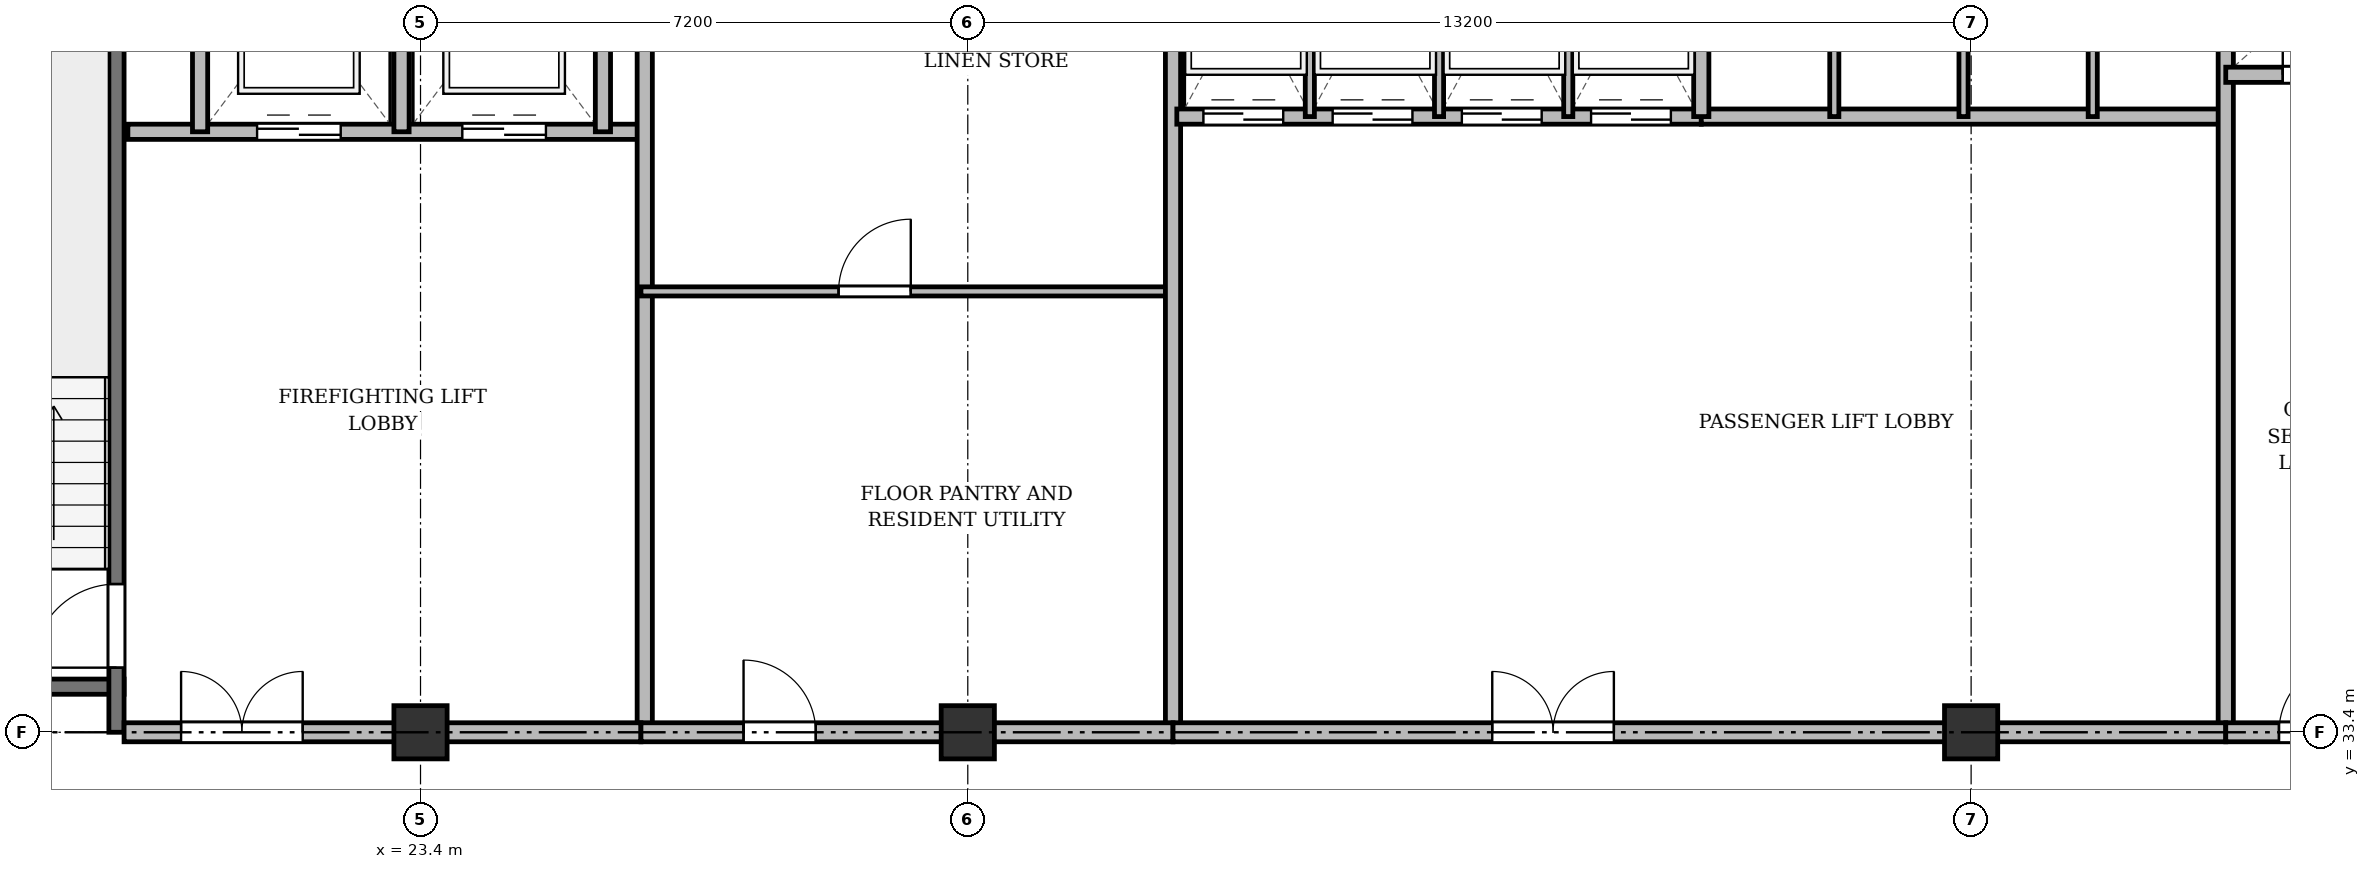
"""IFC4 building model, lengths in metres.
Left out: names, types, materials, properties, quantities, classifications, styles, units other than length and angle.
Written with IfcOpenShell. Run it as: python <this file> out.ifc"""

import sys

from ifc_helpers import new_model, si_unit, direction, frame, frame_2d, origin, origin_2d, place, context, subcontext, project, spatial, rectangle, extrude, source, transform, mapped, element, fill, save


model = new_model("IFC4")
c1 = context("Model", 3, precision=1e-05, world=origin(), true_north=direction((0.0, 1.0)))
c2 = subcontext(c1, "Body", "Model", "MODEL_VIEW")
j1 = project(units=[si_unit("LENGTHUNIT", "METRE"), si_unit("PLANEANGLEUNIT", "RADIAN")], contexts=[c1])
p1 = place(None, origin())
s1 = spatial("IfcSite", under=j1, at=p1, CompositionType="ELEMENT")
p2 = place(p1, origin())
s2 = spatial("IfcBuilding", under=s1, at=p2, CompositionType="ELEMENT")
p3 = place(p2, frame((0.0, 0.0, 164.5)))
s3 = spatial("IfcBuildingStorey", under=s2, at=p3, CompositionType="ELEMENT", Elevation=164.5)
m1 = source(origin(), c2, "Body", "SweptSolid", [
    extrude(rectangle(XDim=0.7, YDim=0.7, at=origin_2d()), origin(), (0.0, 0.0, 1.0), 3.6),
])
for number, where, z_axis, x_axis in (
    (1, (23.4, 33.4, 0.0), (0.0, 0.0, 1.0), (1.0, 0.0, 0.0)),
    (2, (30.6, 33.4, 0.0), (0.0, 0.0, 1.0), (1.0, 0.0, 0.0)),
    (3, (43.8, 33.4, 0.0), (0.0, 0.0, 1.0), (1.0, 0.0, 0.0)),
):
    element("IfcColumn", number, at=place(p3, frame(where, z_axis=z_axis, x_axis=x_axis)), inside=s3, PredefinedType="COLUMN", context=c2, shape_type="MappedRepresentation", body=[
        mapped(m1, transform((0.0, 0.0, 0.0), x_axis=(1.0, 0.0, 0.0), y_axis=(0.0, 1.0, 0.0), z_axis=(0.0, 0.0, 1.0), scale=1.0)),
    ])
p4 = place(p3, frame((16.1, 34.0, 0.0), z_axis=(0.0, 0.0, 1.0), x_axis=(1.0, 0.0, 0.0)))
e4 = element("IfcWall", 4, at=p4, inside=s3, PredefinedType="SHEAR", context=c2, shape_type="SweptSolid", body=[
    extrude(rectangle(XDim=3.4, YDim=0.2, at=frame_2d((1.7, 0.0))), origin(), (0.0, 0.0, 1.0), 3.35),
])
p5 = place(p3, frame((19.4, 33.4, 0.0), z_axis=(0.0, 0.0, 1.0), x_axis=(0.0, 1.0, 0.0)))
e5 = element("IfcWall", 5, at=p5, inside=s3, PredefinedType="SHEAR", context=c2, shape_type="SweptSolid", body=[
    extrude(rectangle(XDim=11.1, YDim=0.2, at=frame_2d((5.55, 0.0))), origin(), (0.0, 0.0, 1.0), 3.35),
])
p6 = place(p5, frame((0.85, 0.0, 0.0)))
e6 = element("IfcOpeningElement", 6, at=p6, cuts=e5, PredefinedType="OPENING", context=c2, shape_type="SweptSolid", body=[
    extrude(rectangle(XDim=1.1, YDim=2.15, at=frame_2d((0.55, 1.075))), frame((0.0, 0.11, 0.0), z_axis=(0.0, -1.0, 0.0), x_axis=(1.0, 0.0, 0.0)), (0.0, 0.0, 1.0), 0.22),
])
p7 = place(p3, frame((19.55, 41.3, 0.0), z_axis=(0.0, 0.0, 1.0), x_axis=(1.0, 0.0, 0.0)))
e7 = element("IfcWall", 7, at=p7, inside=s3, PredefinedType="SOLIDWALL", context=c2, shape_type="SweptSolid", body=[
    extrude(rectangle(XDim=6.75, YDim=0.2, at=frame_2d((3.375, 0.0))), origin(), (0.0, 0.0, 1.0), 3.35),
])
p8 = place(p7, frame((1.7, 0.0, 0.0)))
e8 = element("IfcOpeningElement", 8, at=p8, cuts=e7, PredefinedType="OPENING", context=c2, shape_type="SweptSolid", body=[
    extrude(rectangle(XDim=1.1, YDim=2.15, at=frame_2d((0.55, 1.075))), frame((0.0, 0.11, 0.0), z_axis=(0.0, -1.0, 0.0), x_axis=(1.0, 0.0, 0.0)), (0.0, 0.0, 1.0), 0.22),
])
p9 = place(p7, frame((4.4, 0.0, 0.0)))
e9 = element("IfcOpeningElement", 9, at=p9, cuts=e7, PredefinedType="OPENING", context=c2, shape_type="SweptSolid", body=[
    extrude(rectangle(XDim=1.1, YDim=2.15, at=frame_2d((0.55, 1.075))), frame((0.0, 0.11, 0.0), z_axis=(0.0, -1.0, 0.0), x_axis=(1.0, 0.0, 0.0)), (0.0, 0.0, 1.0), 0.22),
])
for number, where, z_axis, x_axis in (
    (10, (20.5, 41.3, 0.0), (0.0, 0.0, 1.0), (0.0, 1.0, 0.0)),
    (11, (23.15, 41.3, 0.0), (0.0, 0.0, 1.0), (0.0, 1.0, 0.0)),
    (12, (25.8, 41.3, 0.0), (0.0, 0.0, 1.0), (0.0, 1.0, 0.0)),
):
    element("IfcWall", number, at=place(p3, frame(where, z_axis=z_axis, x_axis=x_axis)), inside=s3, PredefinedType="SOLIDWALL", context=c2, shape_type="SweptSolid", body=[
        extrude(rectangle(XDim=3.4, YDim=0.2, at=frame_2d((1.7, 0.0))), origin(), (0.0, 0.0, 1.0), 3.35),
    ])
p10 = place(p3, frame((26.35, 33.4, 0.0), z_axis=(0.0, 0.0, 1.0), x_axis=(0.0, 1.0, 0.0)))
e13 = element("IfcWall", 13, at=p10, inside=s3, PredefinedType="SOLIDWALL", context=c2, shape_type="SweptSolid", body=[
    extrude(rectangle(XDim=11.3, YDim=0.2, at=frame_2d((5.65, 0.0))), origin(), (0.0, 0.0, 1.0), 2.75),
])
p11 = place(p3, frame((19.5, 33.4, 0.0), z_axis=(0.0, 0.0, 1.0), x_axis=(1.0, 0.0, 0.0)))
e14 = element("IfcWall", 14, at=p11, inside=s3, PredefinedType="PARTITIONING", context=c2, shape_type="SweptSolid", body=[
    extrude(rectangle(XDim=6.8, YDim=0.25, at=frame_2d((3.4, 0.0))), origin(), (0.0, 0.0, 1.0), 2.75),
])
p12 = place(p11, frame((0.75, 0.0, 0.0)))
e15 = element("IfcOpeningElement", 15, at=p12, cuts=e14, PredefinedType="OPENING", context=c2, shape_type="SweptSolid", body=[
    extrude(rectangle(XDim=1.6, YDim=2.2, at=frame_2d((0.8, 1.1))), frame((0.0, 0.135, 0.0), z_axis=(0.0, -1.0, 0.0), x_axis=(1.0, 0.0, 0.0)), (0.0, 0.0, 1.0), 0.27),
])
p13 = place(p3, frame((26.3, 39.2, 0.0), z_axis=(0.0, 0.0, 1.0), x_axis=(1.0, 0.0, 0.0)))
e16 = element("IfcWall", 16, at=p13, inside=s3, PredefinedType="PARTITIONING", context=c2, shape_type="SweptSolid", body=[
    extrude(rectangle(XDim=7.0, YDim=0.12, at=frame_2d((3.5, 0.0))), origin(), (0.0, 0.0, 1.0), 2.85),
])
p14 = place(p13, frame((2.6, 0.0, 0.0)))
e17 = element("IfcOpeningElement", 17, at=p14, cuts=e16, PredefinedType="OPENING", context=c2, shape_type="SweptSolid", body=[
    extrude(rectangle(XDim=0.95, YDim=2.15, at=frame_2d((0.475, 1.075))), frame((0.0, 0.07, 0.0), z_axis=(0.0, -1.0, 0.0), x_axis=(1.0, 0.0, 0.0)), (0.0, 0.0, 1.0), 0.14),
])
p15 = place(p3, frame((33.3, 33.4, 0.0), z_axis=(0.0, 0.0, 1.0), x_axis=(0.0, 1.0, 0.0)))
e18 = element("IfcWall", 18, at=p15, inside=s3, PredefinedType="SOLIDWALL", context=c2, shape_type="SweptSolid", body=[
    extrude(rectangle(XDim=11.3, YDim=0.2, at=frame_2d((5.65, 0.0))), origin(), (0.0, 0.0, 1.0), 2.75),
])
p16 = place(p3, frame((33.35, 41.5, 0.0), z_axis=(0.0, 0.0, 1.0), x_axis=(1.0, 0.0, 0.0)))
e19 = element("IfcWall", 19, at=p16, inside=s3, PredefinedType="SOLIDWALL", context=c2, shape_type="SweptSolid", body=[
    extrude(rectangle(XDim=6.9, YDim=0.2, at=frame_2d((3.45, 0.0))), origin(), (0.0, 0.0, 1.0), 3.35),
])
p17 = place(p16, frame((0.35, 0.0, 0.0)))
e20 = element("IfcOpeningElement", 20, at=p17, cuts=e19, PredefinedType="OPENING", context=c2, shape_type="SweptSolid", body=[
    extrude(rectangle(XDim=1.05, YDim=2.15, at=frame_2d((0.525, 1.075))), frame((0.0, 0.11, 0.0), z_axis=(0.0, -1.0, 0.0), x_axis=(1.0, 0.0, 0.0)), (0.0, 0.0, 1.0), 0.22),
])
p18 = place(p16, frame((2.05, 0.0, 0.0)))
e21 = element("IfcOpeningElement", 21, at=p18, cuts=e19, PredefinedType="OPENING", context=c2, shape_type="SweptSolid", body=[
    extrude(rectangle(XDim=1.05, YDim=2.15, at=frame_2d((0.525, 1.075))), frame((0.0, 0.11, 0.0), z_axis=(0.0, -1.0, 0.0), x_axis=(1.0, 0.0, 0.0)), (0.0, 0.0, 1.0), 0.22),
])
p19 = place(p16, frame((3.75, 0.0, 0.0)))
e22 = element("IfcOpeningElement", 22, at=p19, cuts=e19, PredefinedType="OPENING", context=c2, shape_type="SweptSolid", body=[
    extrude(rectangle(XDim=1.05, YDim=2.15, at=frame_2d((0.525, 1.075))), frame((0.0, 0.11, 0.0), z_axis=(0.0, -1.0, 0.0), x_axis=(1.0, 0.0, 0.0)), (0.0, 0.0, 1.0), 0.22),
])
p20 = place(p16, frame((5.45, 0.0, 0.0)))
e23 = element("IfcOpeningElement", 23, at=p20, cuts=e19, PredefinedType="OPENING", context=c2, shape_type="SweptSolid", body=[
    extrude(rectangle(XDim=1.05, YDim=2.15, at=frame_2d((0.525, 1.075))), frame((0.0, 0.11, 0.0), z_axis=(0.0, -1.0, 0.0), x_axis=(1.0, 0.0, 0.0)), (0.0, 0.0, 1.0), 0.22),
])
for number, where, z_axis, x_axis in (
    (24, (35.1, 41.5, 0.0), (0.0, 0.0, 1.0), (0.0, 1.0, 0.0)),
    (25, (36.8, 41.5, 0.0), (0.0, 0.0, 1.0), (0.0, 1.0, 0.0)),
    (26, (38.5, 41.5, 0.0), (0.0, 0.0, 1.0), (0.0, 1.0, 0.0)),
):
    element("IfcWall", number, at=place(p3, frame(where, z_axis=z_axis, x_axis=x_axis)), inside=s3, PredefinedType="PARTITIONING", context=c2, shape_type="SweptSolid", body=[
        extrude(rectangle(XDim=3.2, YDim=0.12, at=frame_2d((1.6, 0.0))), origin(), (0.0, 0.0, 1.0), 3.35),
    ])
p21 = place(p3, frame((40.25, 41.5, 0.0), z_axis=(0.0, 0.0, 1.0), x_axis=(1.0, 0.0, 0.0)))
e27 = element("IfcWall", 27, at=p21, inside=s3, PredefinedType="SOLIDWALL", context=c2, shape_type="SweptSolid", body=[
    extrude(rectangle(XDim=6.9, YDim=0.2, at=frame_2d((3.45, 0.0))), origin(), (0.0, 0.0, 1.0), 2.85),
])
p22 = place(p3, frame((40.25, 41.5, 0.0), z_axis=(0.0, 0.0, 1.0), x_axis=(0.0, 1.0, 0.0)))
e28 = element("IfcWall", 28, at=p22, inside=s3, PredefinedType="SOLIDWALL", context=c2, shape_type="SweptSolid", body=[
    extrude(rectangle(XDim=3.2, YDim=0.2, at=frame_2d((1.6, 0.0))), origin(), (0.0, 0.0, 1.0), 3.35),
])
p23 = place(p3, frame((42.0, 41.5, 0.0), z_axis=(0.0, 0.0, 1.0), x_axis=(0.0, 1.0, 0.0)))
e29 = element("IfcWall", 29, at=p23, inside=s3, PredefinedType="PARTITIONING", context=c2, shape_type="SweptSolid", body=[
    extrude(rectangle(XDim=3.2, YDim=0.12, at=frame_2d((1.6, 0.0))), origin(), (0.0, 0.0, 1.0), 3.35),
])
p24 = place(p3, frame((43.7, 41.5, 0.0), z_axis=(0.0, 0.0, 1.0), x_axis=(0.0, 1.0, 0.0)))
e30 = element("IfcWall", 30, at=p24, inside=s3, PredefinedType="PARTITIONING", context=c2, shape_type="SweptSolid", body=[
    extrude(rectangle(XDim=3.2, YDim=0.12, at=frame_2d((1.6, 0.0))), origin(), (0.0, 0.0, 1.0), 2.85),
])
p25 = place(p3, frame((45.4, 41.5, 0.0), z_axis=(0.0, 0.0, 1.0), x_axis=(0.0, 1.0, 0.0)))
e31 = element("IfcWall", 31, at=p25, inside=s3, PredefinedType="PARTITIONING", context=c2, shape_type="SweptSolid", body=[
    extrude(rectangle(XDim=3.2, YDim=0.12, at=frame_2d((1.6, 0.0))), origin(), (0.0, 0.0, 1.0), 3.35),
])
p26 = place(p3, frame((47.15, 33.4, 0.0), z_axis=(0.0, 0.0, 1.0), x_axis=(0.0, 1.0, 0.0)))
e32 = element("IfcWall", 32, at=p26, inside=s3, PredefinedType="SOLIDWALL", context=c2, shape_type="SweptSolid", body=[
    extrude(rectangle(XDim=11.3, YDim=0.2, at=frame_2d((5.65, 0.0))), origin(), (0.0, 0.0, 1.0), 2.75),
])
p27 = place(p3, frame((26.3, 33.4, 0.0), z_axis=(0.0, 0.0, 1.0), x_axis=(1.0, 0.0, 0.0)))
e33 = element("IfcWall", 33, at=p27, inside=s3, PredefinedType="PARTITIONING", context=c2, shape_type="SweptSolid", body=[
    extrude(rectangle(XDim=7.0, YDim=0.25, at=frame_2d((3.5, 0.0))), origin(), (0.0, 0.0, 1.0), 2.75),
])
p28 = place(p27, frame((1.35, 0.0, 0.0)))
e34 = element("IfcOpeningElement", 34, at=p28, cuts=e33, PredefinedType="OPENING", context=c2, shape_type="SweptSolid", body=[
    extrude(rectangle(XDim=0.95, YDim=2.15, at=frame_2d((0.475, 1.075))), frame((0.0, 0.135, 0.0), z_axis=(0.0, -1.0, 0.0), x_axis=(1.0, 0.0, 0.0)), (0.0, 0.0, 1.0), 0.27),
])
p29 = place(p3, frame((33.3, 33.4, 0.0), z_axis=(0.0, 0.0, 1.0), x_axis=(1.0, 0.0, 0.0)))
e35 = element("IfcWall", 35, at=p29, inside=s3, PredefinedType="PARTITIONING", context=c2, shape_type="SweptSolid", body=[
    extrude(rectangle(XDim=13.85, YDim=0.25, at=frame_2d((6.925, 0.0))), origin(), (0.0, 0.0, 1.0), 2.75),
])
p30 = place(p29, frame((4.2, 0.0, 0.0)))
e36 = element("IfcOpeningElement", 36, at=p30, cuts=e35, PredefinedType="OPENING", context=c2, shape_type="SweptSolid", body=[
    extrude(rectangle(XDim=1.6, YDim=2.2, at=frame_2d((0.8, 1.1))), frame((0.0, 0.135, 0.0), z_axis=(0.0, -1.0, 0.0), x_axis=(1.0, 0.0, 0.0)), (0.0, 0.0, 1.0), 0.27),
])
p31 = place(p3, frame((47.15, 42.05, 0.0), z_axis=(0.0, 0.0, 1.0), x_axis=(1.0, 0.0, 0.0)))
e37 = element("IfcWall", 37, at=p31, inside=s3, PredefinedType="SOLIDWALL", context=c2, shape_type="SweptSolid", body=[
    extrude(rectangle(XDim=7.85, YDim=0.2, at=frame_2d((3.925, 0.0))), origin(), (0.0, 0.0, 1.0), 2.85),
])
p32 = place(p31, frame((0.75, 0.0, 0.0)))
e38 = element("IfcOpeningElement", 38, at=p32, cuts=e37, PredefinedType="OPENING", context=c2, shape_type="SweptSolid", body=[
    extrude(rectangle(XDim=0.9, YDim=2.1, at=frame_2d((0.45, 1.05))), frame((0.0, 0.11, 0.0), z_axis=(0.0, -1.0, 0.0), x_axis=(1.0, 0.0, 0.0)), (0.0, 0.0, 1.0), 0.22),
])
p33 = place(p31, frame((3.85, 0.0, 0.0)))
e39 = element("IfcOpeningElement", 39, at=p33, cuts=e37, PredefinedType="OPENING", context=c2, shape_type="SweptSolid", body=[
    extrude(rectangle(XDim=0.9, YDim=2.1, at=frame_2d((0.45, 1.05))), frame((0.0, 0.11, 0.0), z_axis=(0.0, -1.0, 0.0), x_axis=(1.0, 0.0, 0.0)), (0.0, 0.0, 1.0), 0.22),
])
p34 = place(p3, frame((47.15, 33.4, 0.0), z_axis=(0.0, 0.0, 1.0), x_axis=(1.0, 0.0, 0.0)))
e40 = element("IfcWall", 40, at=p34, inside=s3, PredefinedType="PARTITIONING", context=c2, shape_type="SweptSolid", body=[
    extrude(rectangle(XDim=11.15, YDim=0.25, at=frame_2d((5.575, 0.0))), origin(), (0.0, 0.0, 1.0), 2.75),
])
p35 = place(p34, frame((0.7, 0.0, 0.0)))
e41 = element("IfcOpeningElement", 41, at=p35, cuts=e40, PredefinedType="OPENING", context=c2, shape_type="SweptSolid", body=[
    extrude(rectangle(XDim=0.95, YDim=2.15, at=frame_2d((0.475, 1.075))), frame((0.0, 0.135, 0.0), z_axis=(0.0, -1.0, 0.0), x_axis=(1.0, 0.0, 0.0)), (0.0, 0.0, 1.0), 0.27),
])
p36 = place(p34, frame((6.0, 0.0, 0.0)))
e42 = element("IfcOpeningElement", 42, at=p36, cuts=e40, PredefinedType="OPENING", context=c2, shape_type="SweptSolid", body=[
    extrude(rectangle(XDim=1.2, YDim=2.15, at=frame_2d((0.6, 1.075))), frame((0.0, 0.135, 0.0), z_axis=(0.0, -1.0, 0.0), x_axis=(1.0, 0.0, 0.0)), (0.0, 0.0, 1.0), 0.27),
])
m2 = source(origin(), c2, "Body", "SweptSolid", [
    extrude(rectangle(XDim=1.1, YDim=2.15, at=frame_2d((0.55, 1.075))), frame((0.0, 0.025, 0.0), z_axis=(0.0, -1.0, 0.0), x_axis=(1.0, 0.0, 0.0)), (0.0, 0.0, 1.0), 0.05),
])
p37 = place(p6, origin())
e43 = element("IfcDoor", 43, at=p37, inside=s3, OperationType="SINGLE_SWING_LEFT", PredefinedType="DOOR", context=c2, shape_type="MappedRepresentation", body=[
    mapped(m2, transform((0.0, 0.0, 0.0), x_axis=(1.0, 0.0, 0.0), y_axis=(0.0, 1.0, 0.0), z_axis=(0.0, 0.0, 1.0), scale=1.0)),
])
fill(e6, e43)
p38 = place(p8, origin())
e44 = element("IfcDoor", 44, at=p38, inside=s3, OperationType="DOUBLE_DOOR_SLIDING", PredefinedType="DOOR", context=c2, shape_type="MappedRepresentation", body=[
    mapped(m2, transform((0.0, 0.0, 0.0), x_axis=(1.0, 0.0, 0.0), y_axis=(0.0, 1.0, 0.0), z_axis=(0.0, 0.0, 1.0), scale=1.0)),
])
fill(e8, e44)
p39 = place(p9, origin())
e45 = element("IfcDoor", 45, at=p39, inside=s3, OperationType="DOUBLE_DOOR_SLIDING", PredefinedType="DOOR", context=c2, shape_type="MappedRepresentation", body=[
    mapped(m2, transform((0.0, 0.0, 0.0), x_axis=(1.0, 0.0, 0.0), y_axis=(0.0, 1.0, 0.0), z_axis=(0.0, 0.0, 1.0), scale=1.0)),
])
fill(e9, e45)
m3 = source(origin(), c2, "Body", "SweptSolid", [
    extrude(rectangle(XDim=1.6, YDim=2.2, at=frame_2d((0.8, 1.1))), frame((0.0, 0.025, 0.0), z_axis=(0.0, -1.0, 0.0), x_axis=(1.0, 0.0, 0.0)), (0.0, 0.0, 1.0), 0.05),
])
p40 = place(p12, origin())
e46 = element("IfcDoor", 46, at=p40, inside=s3, OperationType="DOUBLE_DOOR_SINGLE_SWING", PredefinedType="DOOR", context=c2, shape_type="MappedRepresentation", body=[
    mapped(m3, transform((0.0, 0.0, 0.0), x_axis=(1.0, 0.0, 0.0), y_axis=(0.0, 1.0, 0.0), z_axis=(0.0, 0.0, 1.0), scale=1.0)),
])
fill(e15, e46)
m4 = source(origin(), c2, "Body", "SweptSolid", [
    extrude(rectangle(XDim=0.95, YDim=2.15, at=frame_2d((0.475, 1.075))), frame((0.0, 0.025, 0.0), z_axis=(0.0, -1.0, 0.0), x_axis=(1.0, 0.0, 0.0)), (0.0, 0.0, 1.0), 0.05),
])
p41 = place(p14, origin())
e47 = element("IfcDoor", 47, at=p41, inside=s3, OperationType="SINGLE_SWING_RIGHT", PredefinedType="DOOR", context=c2, shape_type="MappedRepresentation", body=[
    mapped(m4, transform((0.0, 0.0, 0.0), x_axis=(1.0, 0.0, 0.0), y_axis=(0.0, 1.0, 0.0), z_axis=(0.0, 0.0, 1.0), scale=1.0)),
])
fill(e17, e47)
m5 = source(origin(), c2, "Body", "SweptSolid", [
    extrude(rectangle(XDim=1.05, YDim=2.15, at=frame_2d((0.525, 1.075))), frame((0.0, 0.025, 0.0), z_axis=(0.0, -1.0, 0.0), x_axis=(1.0, 0.0, 0.0)), (0.0, 0.0, 1.0), 0.05),
])
p42 = place(p17, origin())
e48 = element("IfcDoor", 48, at=p42, inside=s3, OperationType="DOUBLE_DOOR_SLIDING", PredefinedType="DOOR", context=c2, shape_type="MappedRepresentation", body=[
    mapped(m5, transform((0.0, 0.0, 0.0), x_axis=(1.0, 0.0, 0.0), y_axis=(0.0, 1.0, 0.0), z_axis=(0.0, 0.0, 1.0), scale=1.0)),
])
fill(e20, e48)
p43 = place(p18, origin())
e49 = element("IfcDoor", 49, at=p43, inside=s3, OperationType="DOUBLE_DOOR_SLIDING", PredefinedType="DOOR", context=c2, shape_type="MappedRepresentation", body=[
    mapped(m5, transform((0.0, 0.0, 0.0), x_axis=(1.0, 0.0, 0.0), y_axis=(0.0, 1.0, 0.0), z_axis=(0.0, 0.0, 1.0), scale=1.0)),
])
fill(e21, e49)
p44 = place(p19, origin())
e50 = element("IfcDoor", 50, at=p44, inside=s3, OperationType="DOUBLE_DOOR_SLIDING", PredefinedType="DOOR", context=c2, shape_type="MappedRepresentation", body=[
    mapped(m5, transform((0.0, 0.0, 0.0), x_axis=(1.0, 0.0, 0.0), y_axis=(0.0, 1.0, 0.0), z_axis=(0.0, 0.0, 1.0), scale=1.0)),
])
fill(e22, e50)
p45 = place(p20, origin())
e51 = element("IfcDoor", 51, at=p45, inside=s3, OperationType="DOUBLE_DOOR_SLIDING", PredefinedType="DOOR", context=c2, shape_type="MappedRepresentation", body=[
    mapped(m5, transform((0.0, 0.0, 0.0), x_axis=(1.0, 0.0, 0.0), y_axis=(0.0, 1.0, 0.0), z_axis=(0.0, 0.0, 1.0), scale=1.0)),
])
fill(e23, e51)
p46 = place(p28, origin())
e52 = element("IfcDoor", 52, at=p46, inside=s3, OperationType="SINGLE_SWING_LEFT", PredefinedType="DOOR", context=c2, shape_type="MappedRepresentation", body=[
    mapped(m4, transform((0.0, 0.0, 0.0), x_axis=(1.0, 0.0, 0.0), y_axis=(0.0, 1.0, 0.0), z_axis=(0.0, 0.0, 1.0), scale=1.0)),
])
fill(e34, e52)
p47 = place(p30, origin())
e53 = element("IfcDoor", 53, at=p47, inside=s3, OperationType="DOUBLE_DOOR_SINGLE_SWING", PredefinedType="DOOR", context=c2, shape_type="MappedRepresentation", body=[
    mapped(m3, transform((0.0, 0.0, 0.0), x_axis=(1.0, 0.0, 0.0), y_axis=(0.0, 1.0, 0.0), z_axis=(0.0, 0.0, 1.0), scale=1.0)),
])
fill(e36, e53)
m6 = source(origin(), c2, "Body", "SweptSolid", [
    extrude(rectangle(XDim=0.9, YDim=2.1, at=frame_2d((0.45, 1.05))), frame((0.0, 0.025, 0.0), z_axis=(0.0, -1.0, 0.0), x_axis=(1.0, 0.0, 0.0)), (0.0, 0.0, 1.0), 0.05),
])
p48 = place(p32, origin())
e54 = element("IfcDoor", 54, at=p48, inside=s3, OperationType="SINGLE_SWING_LEFT", PredefinedType="DOOR", context=c2, shape_type="MappedRepresentation", body=[
    mapped(m6, transform((0.0, 0.0, 0.0), x_axis=(1.0, 0.0, 0.0), y_axis=(0.0, 1.0, 0.0), z_axis=(0.0, 0.0, 1.0), scale=1.0)),
])
fill(e38, e54)
p49 = place(p35, origin())
e55 = element("IfcDoor", 55, at=p49, inside=s3, OperationType="SINGLE_SWING_RIGHT", PredefinedType="DOOR", context=c2, shape_type="MappedRepresentation", body=[
    mapped(m4, transform((0.0, 0.0, 0.0), x_axis=(1.0, 0.0, 0.0), y_axis=(0.0, 1.0, 0.0), z_axis=(0.0, 0.0, 1.0), scale=1.0)),
])
fill(e41, e55)
save(model, sys.argv[1])
